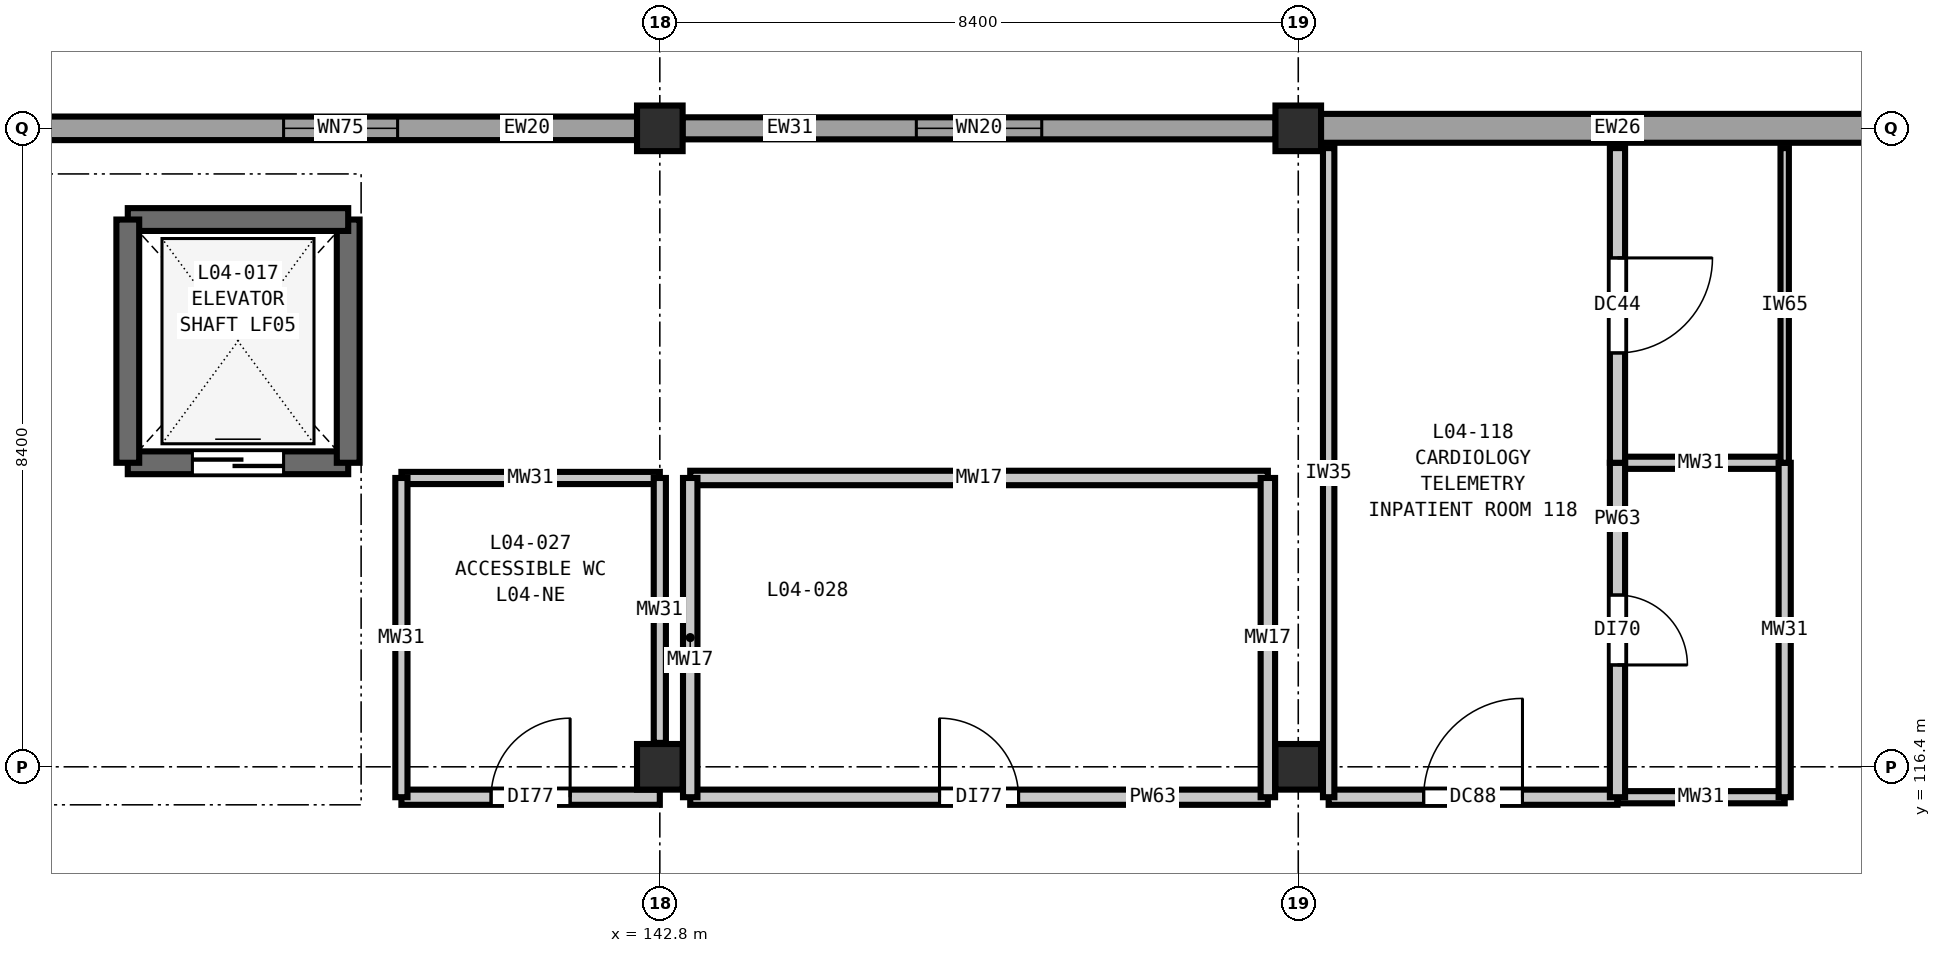
"""IFC4 building model, lengths in metres.
Left out: names, types, materials, properties, quantities, classifications, styles, units other than length and angle.
Written with IfcOpenShell. Run it as: python <this file> out.ifc"""

import sys

from ifc_helpers import new_model, si_unit, direction, frame, frame_2d, origin, origin_2d, place, context, subcontext, project, spatial, rectangle, extrude, element, fill, save


model = new_model("IFC4")
c1 = context("Model", 3, precision=1e-05, world=origin(), true_north=direction((0.0, 1.0)))
c2 = subcontext(c1, "Body", "Model", "MODEL_VIEW")
j1 = project(units=[si_unit("LENGTHUNIT", "METRE"), si_unit("PLANEANGLEUNIT", "RADIAN")], contexts=[c1])
p1 = place(None, origin())
s1 = spatial("IfcSite", under=j1, at=p1, CompositionType="ELEMENT")
p2 = place(p1, origin())
s2 = spatial("IfcBuilding", under=s1, at=p2, CompositionType="ELEMENT")
p3 = place(p2, frame((0.0, 0.0, 20.4)))
s3 = spatial("IfcBuildingStorey", under=s2, at=p3, CompositionType="ELEMENT", Elevation=20.4)
for number, where, z_axis, x_axis in (
    (1, (142.8, 116.4, 0.0), (0.0, 0.0, 1.0), (1.0, 0.0, 0.0)),
    (2, (142.8, 124.8, 0.0), (0.0, 0.0, 1.0), (1.0, 0.0, 0.0)),
    (3, (151.2, 116.4, 0.0), (0.0, 0.0, 1.0), (1.0, 0.0, 0.0)),
    (4, (151.2, 124.8, 0.0), (0.0, 0.0, 1.0), (1.0, 0.0, 0.0)),
):
    element("IfcColumn", number, at=place(p3, frame(where, z_axis=z_axis, x_axis=x_axis)), inside=s3, PredefinedType="COLUMN", context=c2, shape_type="SweptSolid", body=[
        extrude(rectangle(XDim=0.6, YDim=0.6, at=origin_2d()), origin(), (0.0, 0.0, 1.0), 4.2),
    ])
p4 = place(p3, frame((134.698, 124.8, 0.0), z_axis=(0.0, 0.0, 1.0), x_axis=(1.0, 0.0, 0.0)))
e5 = element("IfcWall", 5, at=p4, inside=s3, PredefinedType="SOLIDWALL", context=c2, shape_type="SweptSolid", body=[
    extrude(rectangle(XDim=7.804, YDim=0.31, at=frame_2d((3.902, 0.0))), origin(), (0.0, 0.0, 1.0), 3.48),
])
p5 = place(p4, frame((3.152, 0.0, 0.9)))
e6 = element("IfcOpeningElement", 6, at=p5, cuts=e5, PredefinedType="OPENING", context=c2, shape_type="SweptSolid", body=[
    extrude(rectangle(XDim=1.5, YDim=1.55, at=frame_2d((0.75, 0.775))), frame((0.0, 0.165, 0.0), z_axis=(0.0, -1.0, 0.0), x_axis=(1.0, 0.0, 0.0)), (0.0, 0.0, 1.0), 0.33),
])
p6 = place(p3, frame((143.098, 124.8, 0.0), z_axis=(0.0, 0.0, 1.0), x_axis=(1.0, 0.0, 0.0)))
e7 = element("IfcWall", 7, at=p6, inside=s3, PredefinedType="SOLIDWALL", context=c2, shape_type="SweptSolid", body=[
    extrude(rectangle(XDim=7.804, YDim=0.29, at=frame_2d((3.902, 0.0))), origin(), (0.0, 0.0, 1.0), 3.48),
])
p7 = place(p6, frame((3.077, 0.0, 0.9)))
e8 = element("IfcOpeningElement", 8, at=p7, cuts=e7, PredefinedType="OPENING", context=c2, shape_type="SweptSolid", body=[
    extrude(rectangle(XDim=1.65, YDim=1.55, at=frame_2d((0.825, 0.775))), frame((0.0, 0.155, 0.0), z_axis=(0.0, -1.0, 0.0), x_axis=(1.0, 0.0, 0.0)), (0.0, 0.0, 1.0), 0.31),
])
p8 = place(p3, frame((151.498, 124.8, 0.0), z_axis=(0.0, 0.0, 1.0), x_axis=(1.0, 0.0, 0.0)))
e9 = element("IfcWall", 9, at=p8, inside=s3, PredefinedType="SOLIDWALL", context=c2, shape_type="SweptSolid", body=[
    extrude(rectangle(XDim=7.804, YDim=0.38, at=frame_2d((3.902, 0.0))), origin(), (0.0, 0.0, 1.0), 3.48),
])
p9 = place(p3, frame((135.8, 120.4, 0.0), z_axis=(0.0, 0.0, 1.0), x_axis=(1.0, 0.0, 0.0)))
e10 = element("IfcWall", 10, at=p9, inside=s3, PredefinedType="SHEAR", context=c2, shape_type="SweptSolid", body=[
    extrude(rectangle(XDim=2.9, YDim=0.3, at=frame_2d((1.45, 0.0))), origin(), (0.0, 0.0, 1.0), 4.2),
])
p10 = place(p9, frame((0.85, 0.0, 0.0)))
e11 = element("IfcOpeningElement", 11, at=p10, cuts=e10, PredefinedType="OPENING", context=c2, shape_type="SweptSolid", body=[
    extrude(rectangle(XDim=1.2, YDim=2.2, at=frame_2d((0.6, 1.1))), frame((0.0, 0.16, 0.0), z_axis=(0.0, -1.0, 0.0), x_axis=(1.0, 0.0, 0.0)), (0.0, 0.0, 1.0), 0.32),
])
p11 = place(p3, frame((138.7, 120.4, 0.0), z_axis=(0.0, 0.0, 1.0), x_axis=(0.0, 1.0, 0.0)))
e12 = element("IfcWall", 12, at=p11, inside=s3, PredefinedType="SHEAR", context=c2, shape_type="SweptSolid", body=[
    extrude(rectangle(XDim=3.2, YDim=0.3, at=frame_2d((1.6, 0.0))), origin(), (0.0, 0.0, 1.0), 4.2),
])
p12 = place(p3, frame((138.7, 123.6, 0.0), z_axis=(0.0, 0.0, 1.0), x_axis=(-1.0, 0.0, 0.0)))
e13 = element("IfcWall", 13, at=p12, inside=s3, PredefinedType="SHEAR", context=c2, shape_type="SweptSolid", body=[
    extrude(rectangle(XDim=2.9, YDim=0.3, at=frame_2d((1.45, 0.0))), origin(), (0.0, 0.0, 1.0), 4.2),
])
p13 = place(p3, frame((135.8, 123.6, 0.0), z_axis=(0.0, 0.0, 1.0), x_axis=(0.0, -1.0, 0.0)))
e14 = element("IfcWall", 14, at=p13, inside=s3, PredefinedType="SHEAR", context=c2, shape_type="SweptSolid", body=[
    extrude(rectangle(XDim=3.2, YDim=0.3, at=frame_2d((1.6, 0.0))), origin(), (0.0, 0.0, 1.0), 4.2),
])
p14 = place(p3, frame((139.4, 116.0, 0.0), z_axis=(0.0, 0.0, 1.0), x_axis=(1.0, 0.0, 0.0)))
e15 = element("IfcWall", 15, at=p14, inside=s3, PredefinedType="PARTITIONING", context=c2, shape_type="SweptSolid", body=[
    extrude(rectangle(XDim=3.4, YDim=0.2, at=frame_2d((1.7, 0.0))), origin(), (0.0, 0.0, 1.0), 3.82),
])
p15 = place(p14, frame((1.18, 0.0, 0.0)))
e16 = element("IfcOpeningElement", 16, at=p15, cuts=e15, PredefinedType="OPENING", context=c2, shape_type="SweptSolid", body=[
    extrude(rectangle(XDim=1.04, YDim=2.1, at=frame_2d((0.52, 1.05))), frame((0.0, 0.11, 0.0), z_axis=(0.0, -1.0, 0.0), x_axis=(1.0, 0.0, 0.0)), (0.0, 0.0, 1.0), 0.22),
])
p16 = place(p3, frame((143.2, 116.0, 0.0), z_axis=(0.0, 0.0, 1.0), x_axis=(1.0, 0.0, 0.0)))
e17 = element("IfcWall", 17, at=p16, inside=s3, PredefinedType="PARTITIONING", context=c2, shape_type="SweptSolid", body=[
    extrude(rectangle(XDim=7.6, YDim=0.2, at=frame_2d((3.8, 0.0))), origin(), (0.0, 0.0, 1.0), 3.82),
])
p17 = place(p16, frame((3.28, 0.0, 0.0)))
e18 = element("IfcOpeningElement", 18, at=p17, cuts=e17, PredefinedType="OPENING", context=c2, shape_type="SweptSolid", body=[
    extrude(rectangle(XDim=1.04, YDim=2.1, at=frame_2d((0.52, 1.05))), frame((0.0, 0.11, 0.0), z_axis=(0.0, -1.0, 0.0), x_axis=(1.0, 0.0, 0.0)), (0.0, 0.0, 1.0), 0.22),
])
p18 = place(p3, frame((151.6, 116.0, 0.0), z_axis=(0.0, 0.0, 1.0), x_axis=(1.0, 0.0, 0.0)))
e19 = element("IfcWall", 19, at=p18, inside=s3, PredefinedType="PARTITIONING", context=c2, shape_type="SweptSolid", body=[
    extrude(rectangle(XDim=3.8, YDim=0.2, at=frame_2d((1.9, 0.0))), origin(), (0.0, 0.0, 1.0), 3.82),
])
p19 = place(p18, frame((1.25, 0.0, 0.0)))
e20 = element("IfcOpeningElement", 20, at=p19, cuts=e19, PredefinedType="OPENING", context=c2, shape_type="SweptSolid", body=[
    extrude(rectangle(XDim=1.3, YDim=2.2, at=frame_2d((0.65, 1.1))), frame((0.0, 0.11, 0.0), z_axis=(0.0, -1.0, 0.0), x_axis=(1.0, 0.0, 0.0)), (0.0, 0.0, 1.0), 0.22),
])
p20 = place(p3, frame((155.4, 116.0, 0.0), z_axis=(0.0, 0.0, 1.0), x_axis=(1.0, 0.0, 0.0)))
e21 = element("IfcWall", 21, at=p20, inside=s3, PredefinedType="PLUMBINGWALL", context=c2, shape_type="SweptSolid", body=[
    extrude(rectangle(XDim=2.2, YDim=0.16, at=frame_2d((1.1, 0.0))), origin(), (0.0, 0.0, 1.0), 3.82),
])
p21 = place(p3, frame((139.4, 120.2, 0.0), z_axis=(0.0, 0.0, 1.0), x_axis=(1.0, 0.0, 0.0)))
e22 = element("IfcWall", 22, at=p21, inside=s3, PredefinedType="PLUMBINGWALL", context=c2, shape_type="SweptSolid", body=[
    extrude(rectangle(XDim=3.4, YDim=0.16, at=frame_2d((1.7, 0.0))), origin(), (0.0, 0.0, 1.0), 3.82),
])
p22 = place(p3, frame((143.2, 120.2, 0.0), z_axis=(0.0, 0.0, 1.0), x_axis=(1.0, 0.0, 0.0)))
e23 = element("IfcWall", 23, at=p22, inside=s3, PredefinedType="PLUMBINGWALL", context=c2, shape_type="SweptSolid", body=[
    extrude(rectangle(XDim=7.6, YDim=0.19, at=frame_2d((3.8, 0.0))), origin(), (0.0, 0.0, 1.0), 3.82),
])
p23 = place(p3, frame((155.4, 120.4, 0.0), z_axis=(0.0, 0.0, 1.0), x_axis=(1.0, 0.0, 0.0)))
e24 = element("IfcWall", 24, at=p23, inside=s3, PredefinedType="PLUMBINGWALL", context=c2, shape_type="SweptSolid", body=[
    extrude(rectangle(XDim=2.2, YDim=0.16, at=frame_2d((1.1, 0.0))), origin(), (0.0, 0.0, 1.0), 3.82),
])
p24 = place(p3, frame((139.4, 116.0, 0.0), z_axis=(0.0, 0.0, 1.0), x_axis=(0.0, 1.0, 0.0)))
e25 = element("IfcWall", 25, at=p24, inside=s3, PredefinedType="PLUMBINGWALL", context=c2, shape_type="SweptSolid", body=[
    extrude(rectangle(XDim=4.2, YDim=0.16, at=frame_2d((2.1, 0.0))), origin(), (0.0, 0.0, 1.0), 3.82),
])
p25 = place(p3, frame((142.8, 116.715, 0.0), z_axis=(0.0, 0.0, 1.0), x_axis=(0.0, 1.0, 0.0)))
e26 = element("IfcWall", 26, at=p25, inside=s3, PredefinedType="PLUMBINGWALL", context=c2, shape_type="SweptSolid", body=[
    extrude(rectangle(XDim=3.485, YDim=0.16, at=frame_2d((1.742, 0.0))), origin(), (0.0, 0.0, 1.0), 3.585),
])
for number, where, z_axis, x_axis in (
    (27, (143.2, 116.0, 0.0), (0.0, 0.0, 1.0), (0.0, 1.0, 0.0)),
    (28, (150.8, 116.0, 0.0), (0.0, 0.0, 1.0), (0.0, 1.0, 0.0)),
):
    element("IfcWall", number, at=place(p3, frame(where, z_axis=z_axis, x_axis=x_axis)), inside=s3, PredefinedType="PLUMBINGWALL", context=c2, shape_type="SweptSolid", body=[
        extrude(rectangle(XDim=4.2, YDim=0.19, at=frame_2d((2.1, 0.0))), origin(), (0.0, 0.0, 1.0), 3.82),
    ])
p26 = place(p3, frame((151.6, 116.0, 0.0), z_axis=(0.0, 0.0, 1.0), x_axis=(0.0, 1.0, 0.0)))
e29 = element("IfcWall", 29, at=p26, inside=s3, PredefinedType="PARTITIONING", context=c2, shape_type="SweptSolid", body=[
    extrude(rectangle(XDim=8.54, YDim=0.15, at=frame_2d((4.27, 0.0))), origin(), (0.0, 0.0, 1.0), 3.82),
])
p27 = place(p3, frame((155.4, 116.0, 0.0), z_axis=(0.0, 0.0, 1.0), x_axis=(0.0, 1.0, 0.0)))
e30 = element("IfcWall", 30, at=p27, inside=s3, PredefinedType="PARTITIONING", context=c2, shape_type="SweptSolid", body=[
    extrude(rectangle(XDim=4.4, YDim=0.2, at=frame_2d((2.2, 0.0))), origin(), (0.0, 0.0, 1.0), 3.82),
])
p28 = place(p27, frame((1.74, 0.0, 0.0)))
e31 = element("IfcOpeningElement", 31, at=p28, cuts=e30, PredefinedType="OPENING", context=c2, shape_type="SweptSolid", body=[
    extrude(rectangle(XDim=0.92, YDim=2.1, at=frame_2d((0.46, 1.05))), frame((0.0, 0.11, 0.0), z_axis=(0.0, -1.0, 0.0), x_axis=(1.0, 0.0, 0.0)), (0.0, 0.0, 1.0), 0.22),
])
p29 = place(p3, frame((155.4, 120.4, 0.0), z_axis=(0.0, 0.0, 1.0), x_axis=(0.0, 1.0, 0.0)))
e32 = element("IfcWall", 32, at=p29, inside=s3, PredefinedType="PARTITIONING", context=c2, shape_type="SweptSolid", body=[
    extrude(rectangle(XDim=4.14, YDim=0.2, at=frame_2d((2.07, 0.0))), origin(), (0.0, 0.0, 1.0), 3.82),
])
p30 = place(p29, frame((1.445, 0.0, 0.0)))
e33 = element("IfcOpeningElement", 33, at=p30, cuts=e32, PredefinedType="OPENING", context=c2, shape_type="SweptSolid", body=[
    extrude(rectangle(XDim=1.25, YDim=2.15, at=frame_2d((0.625, 1.075))), frame((0.0, 0.11, 0.0), z_axis=(0.0, -1.0, 0.0), x_axis=(1.0, 0.0, 0.0)), (0.0, 0.0, 1.0), 0.22),
])
p31 = place(p3, frame((157.6, 116.0, 0.0), z_axis=(0.0, 0.0, 1.0), x_axis=(0.0, 1.0, 0.0)))
e34 = element("IfcWall", 34, at=p31, inside=s3, PredefinedType="PLUMBINGWALL", context=c2, shape_type="SweptSolid", body=[
    extrude(rectangle(XDim=4.4, YDim=0.16, at=frame_2d((2.2, 0.0))), origin(), (0.0, 0.0, 1.0), 3.82),
])
p32 = place(p3, frame((157.6, 120.4, 0.0), z_axis=(0.0, 0.0, 1.0), x_axis=(0.0, 1.0, 0.0)))
e35 = element("IfcWall", 35, at=p32, inside=s3, PredefinedType="PARTITIONING", context=c2, shape_type="SweptSolid", body=[
    extrude(rectangle(XDim=4.14, YDim=0.11, at=frame_2d((2.07, 0.0))), origin(), (0.0, 0.0, 1.0), 3.82),
])
p33 = place(p5, origin())
e36 = element("IfcWindow", 36, at=p33, inside=s3, PartitioningType="SINGLE_PANEL", PredefinedType="WINDOW", context=c2, shape_type="SweptSolid", body=[
    extrude(rectangle(XDim=1.5, YDim=1.55, at=frame_2d((0.75, 0.775))), frame((0.0, 0.03, 0.0), z_axis=(0.0, -1.0, 0.0), x_axis=(1.0, 0.0, 0.0)), (0.0, 0.0, 1.0), 0.06),
])
fill(e6, e36)
p34 = place(p7, origin())
e37 = element("IfcWindow", 37, at=p34, inside=s3, PartitioningType="DOUBLE_PANEL_VERTICAL", PredefinedType="WINDOW", context=c2, shape_type="SweptSolid", body=[
    extrude(rectangle(XDim=1.65, YDim=1.55, at=frame_2d((0.825, 0.775))), frame((0.0, 0.03, 0.0), z_axis=(0.0, -1.0, 0.0), x_axis=(1.0, 0.0, 0.0)), (0.0, 0.0, 1.0), 0.06),
])
fill(e8, e37)
p35 = place(p10, origin())
e38 = element("IfcDoor", 38, at=p35, inside=s3, OperationType="DOUBLE_DOOR_SLIDING", PredefinedType="DOOR", context=c2, shape_type="SweptSolid", body=[
    extrude(rectangle(XDim=1.2, YDim=2.2, at=frame_2d((0.6, 1.1))), frame((0.0, 0.025, 0.0), z_axis=(0.0, -1.0, 0.0), x_axis=(1.0, 0.0, 0.0)), (0.0, 0.0, 1.0), 0.05),
])
fill(e11, e38)
p36 = place(p15, origin())
e39 = element("IfcDoor", 39, at=p36, inside=s3, OperationType="SINGLE_SWING_RIGHT", PredefinedType="DOOR", context=c2, shape_type="SweptSolid", body=[
    extrude(rectangle(XDim=1.04, YDim=2.1, at=frame_2d((0.52, 1.05))), frame((0.0, 0.025, 0.0), z_axis=(0.0, -1.0, 0.0), x_axis=(1.0, 0.0, 0.0)), (0.0, 0.0, 1.0), 0.05),
])
fill(e16, e39)
p37 = place(p17, origin())
e40 = element("IfcDoor", 40, at=p37, inside=s3, OperationType="SINGLE_SWING_LEFT", PredefinedType="DOOR", context=c2, shape_type="SweptSolid", body=[
    extrude(rectangle(XDim=1.04, YDim=2.1, at=frame_2d((0.52, 1.05))), frame((0.0, 0.025, 0.0), z_axis=(0.0, -1.0, 0.0), x_axis=(1.0, 0.0, 0.0)), (0.0, 0.0, 1.0), 0.05),
])
fill(e18, e40)
p38 = place(p19, origin())
e41 = element("IfcDoor", 41, at=p38, inside=s3, OperationType="SINGLE_SWING_RIGHT", PredefinedType="DOOR", context=c2, shape_type="SweptSolid", body=[
    extrude(rectangle(XDim=1.3, YDim=2.2, at=frame_2d((0.65, 1.1))), frame((0.0, 0.025, 0.0), z_axis=(0.0, -1.0, 0.0), x_axis=(1.0, 0.0, 0.0)), (0.0, 0.0, 1.0), 0.05),
])
fill(e20, e41)
p39 = place(p28, frame((0.92, 0.0, 0.0), z_axis=(0.0, 0.0, 1.0), x_axis=(-1.0, 0.0, 0.0)))
e42 = element("IfcDoor", 42, at=p39, inside=s3, OperationType="SINGLE_SWING_RIGHT", PredefinedType="DOOR", context=c2, shape_type="SweptSolid", body=[
    extrude(rectangle(XDim=0.92, YDim=2.1, at=frame_2d((0.46, 1.05))), frame((0.0, 0.025, 0.0), z_axis=(0.0, -1.0, 0.0), x_axis=(1.0, 0.0, 0.0)), (0.0, 0.0, 1.0), 0.05),
])
fill(e31, e42)
p40 = place(p30, frame((1.25, 0.0, 0.0), z_axis=(0.0, 0.0, 1.0), x_axis=(-1.0, 0.0, 0.0)))
e43 = element("IfcDoor", 43, at=p40, inside=s3, OperationType="SINGLE_SWING_LEFT", PredefinedType="DOOR", context=c2, shape_type="SweptSolid", body=[
    extrude(rectangle(XDim=1.25, YDim=2.15, at=frame_2d((0.625, 1.075))), frame((0.0, 0.025, 0.0), z_axis=(0.0, -1.0, 0.0), x_axis=(1.0, 0.0, 0.0)), (0.0, 0.0, 1.0), 0.05),
])
fill(e33, e43)
save(model, sys.argv[1])
